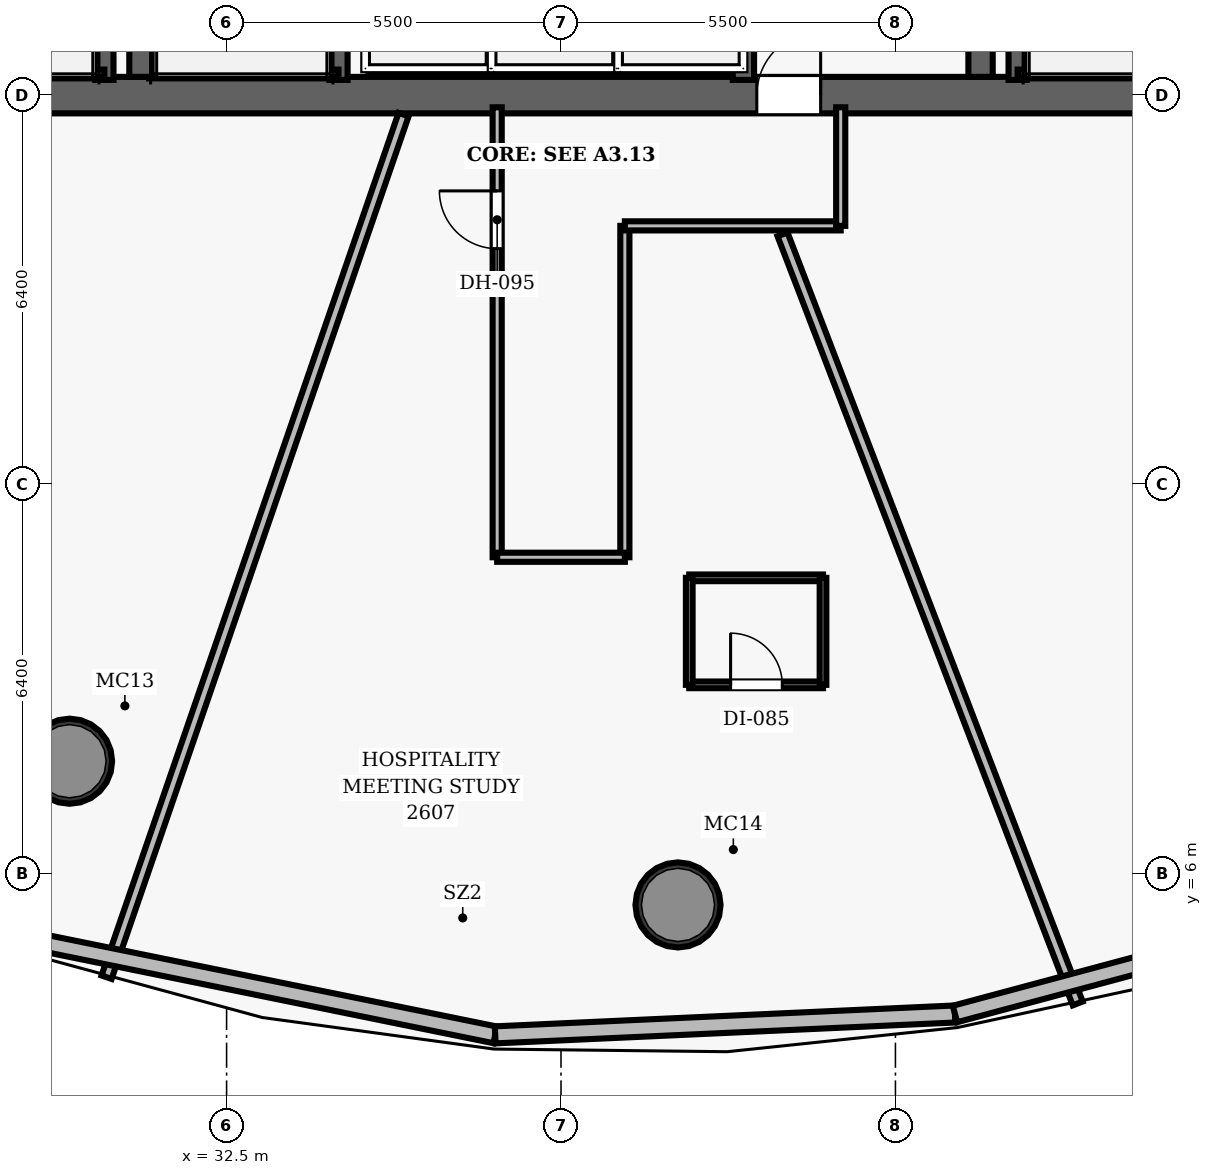
"""IFC4 building model, lengths in metres.
Left out: names, types, materials, properties, quantities, classifications, styles, units other than length and angle.
Written with IfcOpenShell. Run it as: python <this file> out.ifc"""

import sys

from ifc_helpers import new_model, si_unit, direction, frame, frame_2d, origin, origin_2d, place, context, subcontext, project, spatial, rectangle, hollow_circle, extrude, element, fill, save


model = new_model("IFC4")
c1 = context("Model", 3, precision=1e-05, world=origin(), true_north=direction((0.0, 1.0)))
c2 = subcontext(c1, "Body", "Model", "MODEL_VIEW")
j1 = project(units=[si_unit("LENGTHUNIT", "METRE"), si_unit("PLANEANGLEUNIT", "RADIAN")], contexts=[c1])
p1 = place(None, origin())
s1 = spatial("IfcSite", under=j1, at=p1, CompositionType="ELEMENT")
p2 = place(p1, origin())
s2 = spatial("IfcBuilding", under=s1, at=p2, CompositionType="ELEMENT")
p3 = place(p2, frame((0.0, 0.0, 109.8)))
s3 = spatial("IfcBuildingStorey", under=s2, at=p3, CompositionType="ELEMENT", Elevation=109.8)
p4 = place(p3, frame((26.7, 18.8, 0.0), z_axis=(0.0, 0.0, 1.0), x_axis=(1.0, 0.0, 0.0)))
e1 = element("IfcWall", 1, at=p4, inside=s3, PredefinedType="SHEAR", context=c2, shape_type="SweptSolid", body=[
    extrude(rectangle(XDim=22.6, YDim=0.6, at=frame_2d((11.3, 0.0))), origin(), (0.0, 0.0, 1.0), 3.5),
])
p5 = place(p4, frame((14.52, 0.0, 0.0)))
e2 = element("IfcOpeningElement", 2, at=p5, cuts=e1, PredefinedType="OPENING", context=c2, shape_type="SweptSolid", body=[
    extrude(rectangle(XDim=1.05, YDim=2.15, at=frame_2d((0.525, 1.075))), frame((0.0, 0.31, 0.0), z_axis=(0.0, -1.0, 0.0), x_axis=(1.0, 0.0, 0.0)), (0.0, 0.0, 1.0), 0.62),
])
for number, where, z_axis, x_axis in (
    (3, (31.1, 19.1, 0.0), (0.0, 0.0, 1.0), (0.0, 1.0, 0.0)),
    (4, (44.9, 19.1, 0.0), (0.0, 0.0, 1.0), (0.0, 1.0, 0.0)),
):
    element("IfcWall", number, at=place(p3, frame(where, z_axis=z_axis, x_axis=x_axis)), inside=s3, PredefinedType="SHEAR", context=c2, shape_type="SweptSolid", body=[
        extrude(rectangle(XDim=13.8, YDim=0.4, at=frame_2d((6.9, 0.0))), origin(), (0.0, 0.0, 1.0), 3.5),
    ])
for number, where, z_axis, x_axis in (
    (5, (29.917, 7.846, 0.0), (0.0, 0.0, 1.0), (1.0, 0.0, 0.0)),
    (6, (39.924, 5.483, 0.0), (0.0, 0.0, 1.0), (1.0, 0.0, 0.0)),
):
    element("IfcColumn", number, at=place(p3, frame(where, z_axis=z_axis, x_axis=x_axis)), inside=s3, PredefinedType="COLUMN", context=c2, shape_type="SweptSolid", body=[
        extrude(hollow_circle(Radius=0.7, WallThickness=0.055, at=origin_2d()), origin(), (0.0, 0.0, 1.0), 3.5),
    ])
p6 = place(p3, frame((30.49, 19.05, 0.0), z_axis=(0.0, 0.0, 1.0), x_axis=(0.0, 1.0, 0.0)))
e7 = element("IfcWall", 7, at=p6, inside=s3, PredefinedType="SHEAR", context=c2, shape_type="SweptSolid", body=[
    extrude(rectangle(XDim=7.5, YDim=0.3, at=frame_2d((3.75, 0.0))), origin(), (0.0, 0.0, 1.0), 3.5),
])
p7 = place(p3, frame((27.395, 19.16, 0.0), z_axis=(0.0, 0.0, 1.0), x_axis=(1.0, 0.0, 0.0)))
e8 = element("IfcWall", 8, at=p7, inside=s3, PredefinedType="SHEAR", context=c2, shape_type="SweptSolid", body=[
    extrude(rectangle(XDim=3.095, YDim=0.12, at=frame_2d((1.547, 0.0))), origin(), (0.0, 0.0, 1.0), 3.5),
])
p8 = place(p3, frame((45.51, 19.05, 0.0), z_axis=(0.0, 0.0, 1.0), x_axis=(0.0, 1.0, 0.0)))
e9 = element("IfcWall", 9, at=p8, inside=s3, PredefinedType="SHEAR", context=c2, shape_type="SweptSolid", body=[
    extrude(rectangle(XDim=7.5, YDim=0.3, at=frame_2d((3.75, 0.0))), origin(), (0.0, 0.0, 1.0), 3.5),
])
p9 = place(p3, frame((45.51, 19.16, 0.0), z_axis=(0.0, 0.0, 1.0), x_axis=(1.0, 0.0, 0.0)))
e10 = element("IfcWall", 10, at=p9, inside=s3, PredefinedType="SHEAR", context=c2, shape_type="SweptSolid", body=[
    extrude(rectangle(XDim=3.095, YDim=0.12, at=frame_2d((1.547, 0.0))), origin(), (0.0, 0.0, 1.0), 3.5),
])
p10 = place(p3, frame((34.34, 19.05, 0.0), z_axis=(0.0, 0.0, 1.0), x_axis=(0.0, 1.0, 0.0)))
e11 = element("IfcWall", 11, at=p10, inside=s3, PredefinedType="SHEAR", context=c2, shape_type="SweptSolid", body=[
    extrude(rectangle(XDim=7.5, YDim=0.3, at=frame_2d((3.75, 0.0))), origin(), (0.0, 0.0, 1.0), 3.5),
])
p11 = place(p3, frame((31.3, 19.16, 0.0), z_axis=(0.0, 0.0, 1.0), x_axis=(1.0, 0.0, 0.0)))
e12 = element("IfcWall", 12, at=p11, inside=s3, PredefinedType="SHEAR", context=c2, shape_type="SweptSolid", body=[
    extrude(rectangle(XDim=3.04, YDim=0.12, at=frame_2d((1.52, 0.0))), origin(), (0.0, 0.0, 1.0), 3.5),
])
p12 = place(p3, frame((41.0, 19.05, 0.0), z_axis=(0.0, 0.0, 1.0), x_axis=(0.0, 1.0, 0.0)))
e13 = element("IfcWall", 13, at=p12, inside=s3, PredefinedType="SHEAR", context=c2, shape_type="SweptSolid", body=[
    extrude(rectangle(XDim=2.08, YDim=0.35, at=frame_2d((1.04, 0.0))), origin(), (0.0, 0.0, 1.0), 2.675),
])
p13 = place(p3, frame((36.95, 11.2, 0.0), z_axis=(0.0, 0.0, 1.0), x_axis=(0.0, 1.0, 0.0)))
e14 = element("IfcWall", 14, at=p13, inside=s3, PredefinedType="PARTITIONING", context=c2, shape_type="SweptSolid", body=[
    extrude(rectangle(XDim=7.4, YDim=0.15, at=frame_2d((3.7, 0.0))), origin(), (0.0, 0.0, 1.0), 2.675),
])
p14 = place(p13, frame((5.075, 0.0, 0.0)))
e15 = element("IfcOpeningElement", 15, at=p14, cuts=e14, PredefinedType="OPENING", context=c2, shape_type="SweptSolid", body=[
    extrude(rectangle(XDim=0.95, YDim=2.15, at=frame_2d((0.475, 1.075))), frame((0.0, 0.085, 0.0), z_axis=(0.0, -1.0, 0.0), x_axis=(1.0, 0.0, 0.0)), (0.0, 0.0, 1.0), 0.17),
])
p15 = place(p3, frame((39.05, 11.2, 0.0), z_axis=(0.0, 0.0, 1.0), x_axis=(0.0, 1.0, 0.0)))
e16 = element("IfcWall", 16, at=p15, inside=s3, PredefinedType="PARTITIONING", context=c2, shape_type="SweptSolid", body=[
    extrude(rectangle(XDim=5.45, YDim=0.15, at=frame_2d((2.725, 0.0))), origin(), (0.0, 0.0, 1.0), 2.675),
])
p16 = place(p3, frame((39.05, 16.65, 0.0), z_axis=(0.0, 0.0, 1.0), x_axis=(1.0, 0.0, 0.0)))
e17 = element("IfcWall", 17, at=p16, inside=s3, PredefinedType="PARTITIONING", context=c2, shape_type="SweptSolid", body=[
    extrude(rectangle(XDim=3.55, YDim=0.15, at=frame_2d((1.775, 0.0))), origin(), (0.0, 0.0, 1.0), 2.675),
])
p17 = place(p3, frame((42.6, 16.65, 0.0), z_axis=(0.0, 0.0, 1.0), x_axis=(0.0, 1.0, 0.0)))
e18 = element("IfcWall", 18, at=p17, inside=s3, PredefinedType="PARTITIONING", context=c2, shape_type="SweptSolid", body=[
    extrude(rectangle(XDim=1.95, YDim=0.15, at=frame_2d((0.975, 0.0))), origin(), (0.0, 0.0, 1.0), 2.675),
])
p18 = place(p3, frame((36.95, 11.2, 0.0), z_axis=(0.0, 0.0, 1.0), x_axis=(1.0, 0.0, 0.0)))
e19 = element("IfcWall", 19, at=p18, inside=s3, PredefinedType="PARTITIONING", context=c2, shape_type="SweptSolid", body=[
    extrude(rectangle(XDim=2.1, YDim=0.15, at=frame_2d((1.05, 0.0))), origin(), (0.0, 0.0, 1.0), 2.675),
])
p19 = place(p3, frame((35.411, 18.48, 0.0), z_axis=(0.0, 0.0, 1.0), x_axis=(-0.32557542386, -0.945516072512, 0.0)))
e20 = element("IfcWall", 20, at=p19, inside=s3, PredefinedType="PARTITIONING", context=c2, shape_type="SweptSolid", body=[
    extrude(rectangle(XDim=15.003, YDim=0.175, at=frame_2d((7.502, 0.0))), origin(), (0.0, 0.0, 1.0), 2.675),
])
p20 = place(p3, frame((41.643, 16.51, 0.0), z_axis=(0.0, 0.0, 1.0), x_axis=(0.358366750577, -0.933580886737, 0.0)))
e21 = element("IfcWall", 21, at=p20, inside=s3, PredefinedType="PARTITIONING", context=c2, shape_type="SweptSolid", body=[
    extrude(rectangle(XDim=13.548, YDim=0.175, at=frame_2d((6.774, 0.0))), origin(), (0.0, 0.0, 1.0), 2.675),
])
p21 = place(p3, frame((40.109, 9.102, 0.0), z_axis=(0.0, 0.0, 1.0), x_axis=(1.0, 0.0, 0.0)))
e22 = element("IfcWall", 22, at=p21, inside=s3, PredefinedType="PARTITIONING", context=c2, shape_type="SweptSolid", body=[
    extrude(rectangle(XDim=2.2, YDim=0.11, at=frame_2d((1.1, 0.0))), origin(), (0.0, 0.0, 1.0), 2.675),
])
p22 = place(p21, frame((0.68, 0.0, 0.0)))
e23 = element("IfcOpeningElement", 23, at=p22, cuts=e22, PredefinedType="OPENING", context=c2, shape_type="SweptSolid", body=[
    extrude(rectangle(XDim=0.85, YDim=2.1, at=frame_2d((0.425, 1.05))), frame((0.0, 0.065, 0.0), z_axis=(0.0, -1.0, 0.0), x_axis=(1.0, 0.0, 0.0)), (0.0, 0.0, 1.0), 0.13),
])
p23 = place(p3, frame((40.109, 10.862, 0.0), z_axis=(0.0, 0.0, 1.0), x_axis=(1.0, 0.0, 0.0)))
e24 = element("IfcWall", 24, at=p23, inside=s3, PredefinedType="PARTITIONING", context=c2, shape_type="SweptSolid", body=[
    extrude(rectangle(XDim=2.2, YDim=0.11, at=frame_2d((1.1, 0.0))), origin(), (0.0, 0.0, 1.0), 2.675),
])
for number, where, z_axis, x_axis in (
    (25, (40.109, 9.102, 0.0), (0.0, 0.0, 1.0), (0.0, 1.0, 0.0)),
    (26, (42.309, 9.102, 0.0), (0.0, 0.0, 1.0), (0.0, 1.0, 0.0)),
):
    element("IfcWall", number, at=place(p3, frame(where, z_axis=z_axis, x_axis=x_axis)), inside=s3, PredefinedType="PARTITIONING", context=c2, shape_type="SweptSolid", body=[
        extrude(rectangle(XDim=1.76, YDim=0.11, at=frame_2d((0.88, 0.0))), origin(), (0.0, 0.0, 1.0), 2.675),
    ])
p24 = place(p3, frame((36.918, 3.346, 0.0), z_axis=(0.0, 0.0, 1.0), x_axis=(-0.979920638138, 0.199387920778, 0.0)))
e27 = element("IfcWall", 27, at=p24, inside=s3, PredefinedType="SOLIDWALL", context=c2, shape_type="SweptSolid", body=[
    extrude(rectangle(XDim=7.617, YDim=0.28, at=frame_2d((3.809, 0.0))), origin(), (0.0, 0.0, 1.0), 3.26),
])
p25 = place(p3, frame((44.479, 3.689, 0.0), z_axis=(0.0, 0.0, 1.0), x_axis=(-0.998971198621, -0.045349138101, 0.0)))
e28 = element("IfcWall", 28, at=p25, inside=s3, PredefinedType="SOLIDWALL", context=c2, shape_type="SweptSolid", body=[
    extrude(rectangle(XDim=7.569, YDim=0.28, at=frame_2d((3.785, 0.0))), origin(), (0.0, 0.0, 1.0), 3.26),
])
p26 = place(p3, frame((51.522, 5.579, 0.0), z_axis=(0.0, 0.0, 1.0), x_axis=(-0.965810741731, -0.259248165195, 0.0)))
e29 = element("IfcWall", 29, at=p26, inside=s3, PredefinedType="SOLIDWALL", context=c2, shape_type="SweptSolid", body=[
    extrude(rectangle(XDim=7.292, YDim=0.28, at=frame_2d((3.646, 0.0))), origin(), (0.0, 0.0, 1.0), 3.26),
])
p27 = place(p5, origin())
e30 = element("IfcDoor", 30, at=p27, inside=s3, OperationType="SINGLE_SWING_RIGHT", PredefinedType="DOOR", context=c2, shape_type="SweptSolid", body=[
    extrude(rectangle(XDim=1.05, YDim=2.15, at=frame_2d((0.525, 1.075))), frame((0.0, 0.025, 0.0), z_axis=(0.0, -1.0, 0.0), x_axis=(1.0, 0.0, 0.0)), (0.0, 0.0, 1.0), 0.05),
])
fill(e2, e30)
p28 = place(p14, origin())
e31 = element("IfcDoor", 31, at=p28, inside=s3, OperationType="SINGLE_SWING_RIGHT", PredefinedType="DOOR", context=c2, shape_type="SweptSolid", body=[
    extrude(rectangle(XDim=0.95, YDim=2.15, at=frame_2d((0.475, 1.075))), frame((0.0, 0.025, 0.0), z_axis=(0.0, -1.0, 0.0), x_axis=(1.0, 0.0, 0.0)), (0.0, 0.0, 1.0), 0.05),
])
fill(e15, e31)
p29 = place(p22, origin())
e32 = element("IfcDoor", 32, at=p29, inside=s3, OperationType="SINGLE_SWING_LEFT", PredefinedType="DOOR", context=c2, shape_type="SweptSolid", body=[
    extrude(rectangle(XDim=0.85, YDim=2.1, at=frame_2d((0.425, 1.05))), frame((0.0, 0.025, 0.0), z_axis=(0.0, -1.0, 0.0), x_axis=(1.0, 0.0, 0.0)), (0.0, 0.0, 1.0), 0.05),
])
fill(e23, e32)
save(model, sys.argv[1])
